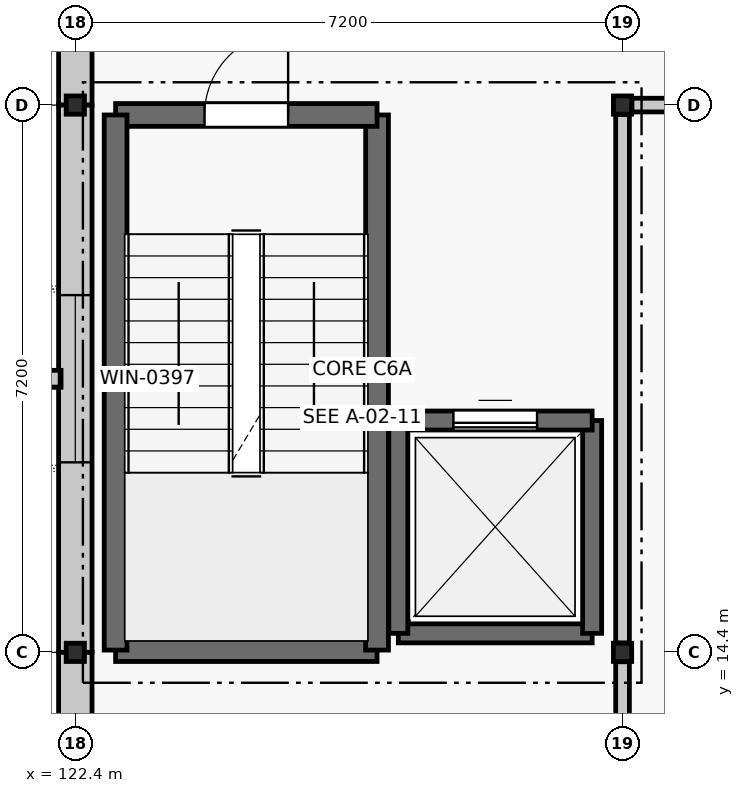
"""IFC4 building model, lengths in metres.
Left out: names, types, materials, properties, quantities, classifications, styles, units other than length and angle.
Written with IfcOpenShell. Run it as: python <this file> out.ifc"""

import sys

from ifc_helpers import new_model, si_unit, direction, frame, frame_2d, origin, origin_2d, place, context, subcontext, project, spatial, rectangle, i_section, extrude, element, fill, save


model = new_model("IFC4")
c1 = context("Model", 3, precision=1e-05, world=origin(), true_north=direction((0.0, 1.0)))
c2 = subcontext(c1, "Body", "Model", "MODEL_VIEW")
j1 = project(units=[si_unit("LENGTHUNIT", "METRE"), si_unit("PLANEANGLEUNIT", "RADIAN")], contexts=[c1])
p1 = place(None, origin())
s1 = spatial("IfcSite", under=j1, at=p1, CompositionType="ELEMENT")
p2 = place(p1, origin())
s2 = spatial("IfcBuilding", under=s1, at=p2, CompositionType="ELEMENT")
p3 = place(p2, frame((0.0, 0.0, 10.2)))
s3 = spatial("IfcBuildingStorey", under=s2, at=p3, CompositionType="ELEMENT", Elevation=10.2)
for number, where, z_axis, x_axis in (
    (1, (122.4, 14.4, 0.0), (0.0, 0.0, 1.0), (1.0, 0.0, 0.0)),
    (2, (122.4, 21.6, 0.0), (0.0, 0.0, 1.0), (1.0, 0.0, 0.0)),
    (3, (129.6, 14.4, 0.0), (0.0, 0.0, 1.0), (1.0, 0.0, 0.0)),
    (4, (129.6, 21.6, 0.0), (0.0, 0.0, 1.0), (1.0, 0.0, 0.0)),
):
    element("IfcColumn", number, at=place(p3, frame(where, z_axis=z_axis, x_axis=x_axis)), inside=s3, PredefinedType="COLUMN", context=c2, shape_type="SweptSolid", body=[
        extrude(i_section(OverallWidth=0.24, OverallDepth=0.24, WebThickness=0.01, FlangeThickness=0.017, FilletRadius=0.021, at=origin_2d()), origin(), (0.0, 0.0, 1.0), 4.2),
    ])
p4 = place(p3, frame((122.4, 28.676, 0.0), z_axis=(0.0, 0.0, 1.0), x_axis=(0.0, -1.0, 0.0)))
e5 = element("IfcWall", 5, at=p4, inside=s3, PredefinedType="SOLIDWALL", context=c2, shape_type="SweptSolid", body=[
    extrude(rectangle(XDim=7.076, YDim=0.44, at=frame_2d((3.538, 0.0))), origin(), (0.0, 0.0, 1.0), 3.2),
])
p5 = place(p4, frame((2.376, 0.0, 0.87)))
e6 = element("IfcOpeningElement", 6, at=p5, cuts=e5, PredefinedType="OPENING", context=c2, shape_type="SweptSolid", body=[
    extrude(rectangle(XDim=2.2, YDim=2.25, at=frame_2d((1.1, 1.125))), frame((0.0, 0.232, 0.0), z_axis=(0.0, -1.0, 0.0), x_axis=(1.0, 0.0, 0.0)), (0.0, 0.0, 1.0), 0.464),
])
p6 = place(p3, frame((122.4, 21.6, 0.0), z_axis=(0.0, 0.0, 1.0), x_axis=(0.0, -1.0, 0.0)))
e7 = element("IfcWall", 7, at=p6, inside=s3, PredefinedType="SOLIDWALL", context=c2, shape_type="SweptSolid", body=[
    extrude(rectangle(XDim=7.2, YDim=0.44, at=frame_2d((3.6, 0.0))), origin(), (0.0, 0.0, 1.0), 3.2),
])
p7 = place(p6, frame((2.5, 0.0, 0.87)))
e8 = element("IfcOpeningElement", 8, at=p7, cuts=e7, PredefinedType="OPENING", context=c2, shape_type="SweptSolid", body=[
    extrude(rectangle(XDim=2.2, YDim=2.25, at=frame_2d((1.1, 1.125))), frame((0.0, 0.232, 0.0), z_axis=(0.0, -1.0, 0.0), x_axis=(1.0, 0.0, 0.0)), (0.0, 0.0, 1.0), 0.464),
])
p8 = place(p3, frame((122.4, 14.4, 0.0), z_axis=(0.0, 0.0, 1.0), x_axis=(0.0, -1.0, 0.0)))
e9 = element("IfcWall", 9, at=p8, inside=s3, PredefinedType="SOLIDWALL", context=c2, shape_type="SweptSolid", body=[
    extrude(rectangle(XDim=7.2, YDim=0.44, at=frame_2d((3.6, 0.0))), origin(), (0.0, 0.0, 1.0), 3.2),
])
p9 = place(p8, frame((2.5, 0.0, 0.87)))
e10 = element("IfcOpeningElement", 10, at=p9, cuts=e9, PredefinedType="OPENING", context=c2, shape_type="SweptSolid", body=[
    extrude(rectangle(XDim=2.2, YDim=2.25, at=frame_2d((1.1, 1.125))), frame((0.0, 0.232, 0.0), z_axis=(0.0, -1.0, 0.0), x_axis=(1.0, 0.0, 0.0)), (0.0, 0.0, 1.0), 0.464),
])
p10 = place(p3, frame((122.93, 14.43, 0.0), z_axis=(0.0, 0.0, 1.0), x_axis=(1.0, 0.0, 0.0)))
e11 = element("IfcWall", 11, at=p10, inside=s3, PredefinedType="SHEAR", context=c2, shape_type="SweptSolid", body=[
    extrude(rectangle(XDim=3.44, YDim=0.3, at=frame_2d((1.72, 0.0))), origin(), (0.0, 0.0, 1.0), 3.92),
])
p11 = place(p3, frame((126.37, 14.43, 0.0), z_axis=(0.0, 0.0, 1.0), x_axis=(0.0, 1.0, 0.0)))
e12 = element("IfcWall", 12, at=p11, inside=s3, PredefinedType="SHEAR", context=c2, shape_type="SweptSolid", body=[
    extrude(rectangle(XDim=7.04, YDim=0.3, at=frame_2d((3.52, 0.0))), origin(), (0.0, 0.0, 1.0), 3.92),
])
p12 = place(p3, frame((126.37, 21.47, 0.0), z_axis=(0.0, 0.0, 1.0), x_axis=(-1.0, 0.0, 0.0)))
e13 = element("IfcWall", 13, at=p12, inside=s3, PredefinedType="SHEAR", context=c2, shape_type="SweptSolid", body=[
    extrude(rectangle(XDim=3.44, YDim=0.3, at=frame_2d((1.72, 0.0))), origin(), (0.0, 0.0, 1.0), 3.92),
])
p13 = place(p12, frame((1.17, 0.0, 0.0)))
e14 = element("IfcOpeningElement", 14, at=p13, cuts=e13, PredefinedType="OPENING", context=c2, shape_type="SweptSolid", body=[
    extrude(rectangle(XDim=1.1, YDim=2.15, at=frame_2d((0.55, 1.075))), frame((0.0, 0.162, 0.0), z_axis=(0.0, -1.0, 0.0), x_axis=(1.0, 0.0, 0.0)), (0.0, 0.0, 1.0), 0.324),
])
p14 = place(p3, frame((122.93, 21.47, 0.0), z_axis=(0.0, 0.0, 1.0), x_axis=(0.0, -1.0, 0.0)))
e15 = element("IfcWall", 15, at=p14, inside=s3, PredefinedType="SHEAR", context=c2, shape_type="SweptSolid", body=[
    extrude(rectangle(XDim=7.04, YDim=0.3, at=frame_2d((3.52, 0.0))), origin(), (0.0, 0.0, 1.0), 3.92),
])
p15 = place(p3, frame((126.65, 14.65, 0.0), z_axis=(0.0, 0.0, 1.0), x_axis=(1.0, 0.0, 0.0)))
e16 = element("IfcWall", 16, at=p15, inside=s3, PredefinedType="SHEAR", context=c2, shape_type="SweptSolid", body=[
    extrude(rectangle(XDim=2.55, YDim=0.25, at=frame_2d((1.275, 0.0))), origin(), (0.0, 0.0, 1.0), 3.92),
])
p16 = place(p3, frame((129.2, 14.65, 0.0), z_axis=(0.0, 0.0, 1.0), x_axis=(0.0, 1.0, 0.0)))
e17 = element("IfcWall", 17, at=p16, inside=s3, PredefinedType="SHEAR", context=c2, shape_type="SweptSolid", body=[
    extrude(rectangle(XDim=2.8, YDim=0.25, at=frame_2d((1.4, 0.0))), origin(), (0.0, 0.0, 1.0), 3.92),
])
p17 = place(p3, frame((129.2, 17.45, 0.0), z_axis=(0.0, 0.0, 1.0), x_axis=(-1.0, 0.0, 0.0)))
e18 = element("IfcWall", 18, at=p17, inside=s3, PredefinedType="SHEAR", context=c2, shape_type="SweptSolid", body=[
    extrude(rectangle(XDim=2.55, YDim=0.25, at=frame_2d((1.275, 0.0))), origin(), (0.0, 0.0, 1.0), 3.92),
])
p18 = place(p17, frame((0.725, 0.0, 0.0)))
e19 = element("IfcOpeningElement", 19, at=p18, cuts=e18, PredefinedType="OPENING", context=c2, shape_type="SweptSolid", body=[
    extrude(rectangle(XDim=1.1, YDim=2.1, at=frame_2d((0.55, 1.05))), frame((0.0, 0.137, 0.0), z_axis=(0.0, -1.0, 0.0), x_axis=(1.0, 0.0, 0.0)), (0.0, 0.0, 1.0), 0.274),
])
p19 = place(p3, frame((126.65, 17.45, 0.0), z_axis=(0.0, 0.0, 1.0), x_axis=(0.0, -1.0, 0.0)))
e20 = element("IfcWall", 20, at=p19, inside=s3, PredefinedType="SHEAR", context=c2, shape_type="SweptSolid", body=[
    extrude(rectangle(XDim=2.8, YDim=0.25, at=frame_2d((1.4, 0.0))), origin(), (0.0, 0.0, 1.0), 3.92),
])
p20 = place(p3, frame((129.724, 21.6, 0.0), z_axis=(0.0, 0.0, 1.0), x_axis=(1.0, 0.0, 0.0)))
e21 = element("IfcWall", 21, at=p20, inside=s3, PredefinedType="PARTITIONING", context=c2, shape_type="SweptSolid", body=[
    extrude(rectangle(XDim=6.952, YDim=0.18, at=frame_2d((3.476, 0.0))), origin(), (0.0, 0.0, 1.0), 3.205),
])
p21 = place(p20, frame((2.776, 0.0, 0.0)))
e22 = element("IfcOpeningElement", 22, at=p21, cuts=e21, PredefinedType="OPENING", context=c2, shape_type="SweptSolid", body=[
    extrude(rectangle(XDim=1.4, YDim=2.2, at=frame_2d((0.7, 1.1))), frame((0.0, 0.102, 0.0), z_axis=(0.0, -1.0, 0.0), x_axis=(1.0, 0.0, 0.0)), (0.0, 0.0, 1.0), 0.204),
])
p22 = place(p3, frame((129.6, 7.324, 0.0), z_axis=(0.0, 0.0, 1.0), x_axis=(0.0, 1.0, 0.0)))
e23 = element("IfcWall", 23, at=p22, inside=s3, PredefinedType="PARTITIONING", context=c2, shape_type="SweptSolid", body=[
    extrude(rectangle(XDim=6.952, YDim=0.18, at=frame_2d((3.476, 0.0))), origin(), (0.0, 0.0, 1.0), 3.015),
])
p23 = place(p3, frame((129.6, 14.524, 0.0), z_axis=(0.0, 0.0, 1.0), x_axis=(0.0, 1.0, 0.0)))
e24 = element("IfcWall", 24, at=p23, inside=s3, PredefinedType="PARTITIONING", context=c2, shape_type="SweptSolid", body=[
    extrude(rectangle(XDim=6.952, YDim=0.18, at=frame_2d((3.476, 0.0))), origin(), (0.0, 0.0, 1.0), 3.015),
])
p24 = place(p7, origin())
e25 = element("IfcWindow", 25, at=p24, inside=s3, PartitioningType="SINGLE_PANEL", PredefinedType="WINDOW", context=c2, shape_type="SweptSolid", body=[
    extrude(rectangle(XDim=2.2, YDim=2.25, at=frame_2d((1.1, 1.125))), frame((0.0, 0.03, 0.0), z_axis=(0.0, -1.0, 0.0), x_axis=(1.0, 0.0, 0.0)), (0.0, 0.0, 1.0), 0.06),
])
fill(e8, e25)
p25 = place(p13, frame((1.1, 0.0, 0.0), z_axis=(0.0, 0.0, 1.0), x_axis=(-1.0, 0.0, 0.0)))
e26 = element("IfcDoor", 26, at=p25, inside=s3, OperationType="SINGLE_SWING_RIGHT", PredefinedType="DOOR", context=c2, shape_type="SweptSolid", body=[
    extrude(rectangle(XDim=1.1, YDim=2.15, at=frame_2d((0.55, 1.075))), frame((0.0, 0.025, 0.0), z_axis=(0.0, -1.0, 0.0), x_axis=(1.0, 0.0, 0.0)), (0.0, 0.0, 1.0), 0.05),
])
fill(e14, e26)
p26 = place(p18, origin())
e27 = element("IfcDoor", 27, at=p26, inside=s3, OperationType="SLIDING_TO_LEFT", PredefinedType="DOOR", context=c2, shape_type="SweptSolid", body=[
    extrude(rectangle(XDim=1.1, YDim=2.1, at=frame_2d((0.55, 1.05))), frame((0.0, 0.025, 0.0), z_axis=(0.0, -1.0, 0.0), x_axis=(1.0, 0.0, 0.0)), (0.0, 0.0, 1.0), 0.05),
])
fill(e19, e27)
save(model, sys.argv[1])
